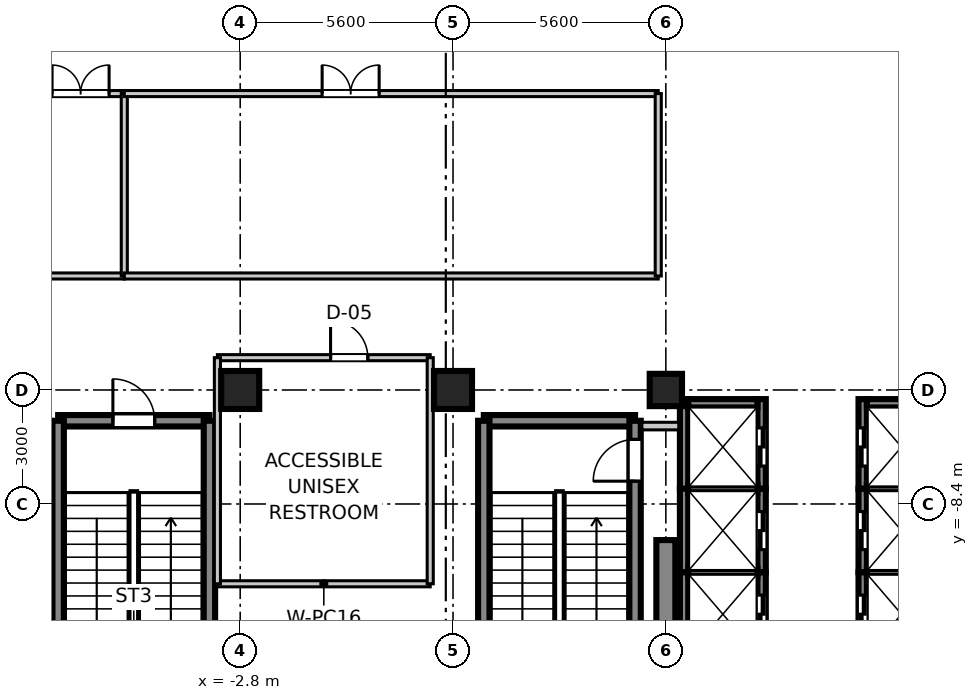
"""IFC4 building model, lengths in metres.
Left out: names, types, materials, properties, quantities, classifications, styles, units other than length and angle.
Written with IfcOpenShell. Run it as: python <this file> out.ifc"""

import sys

from ifc_helpers import new_model, si_unit, direction, frame, frame_2d, origin, origin_2d, place, context, subcontext, project, spatial, rectangle, extrude, source, transform, mapped, element, fill, save


model = new_model("IFC4")
c1 = context("Model", 3, precision=1e-05, world=origin(), true_north=direction((0.0, 1.0)))
c2 = subcontext(c1, "Body", "Model", "MODEL_VIEW")
j1 = project(units=[si_unit("LENGTHUNIT", "METRE"), si_unit("PLANEANGLEUNIT", "RADIAN")], contexts=[c1])
p1 = place(None, origin())
s1 = spatial("IfcSite", under=j1, at=p1, CompositionType="ELEMENT")
p2 = place(p1, origin())
s2 = spatial("IfcBuilding", under=s1, at=p2, CompositionType="ELEMENT")
p3 = place(p2, frame((0.0, 0.0, 256.7)))
s3 = spatial("IfcBuildingStorey", under=s2, at=p3, CompositionType="ELEMENT", Elevation=256.7)
m1 = source(origin(), c2, "Body", "SweptSolid", [
    extrude(rectangle(XDim=1.0, YDim=1.0, at=origin_2d()), origin(), (0.0, 0.0, 1.0), 4.755),
])
for number, where, z_axis, x_axis in (
    (1, (-2.8, -5.4, 0.0), (0.0, 0.0, 1.0), (1.0, 0.0, 0.0)),
    (2, (2.8, -5.4, 0.0), (0.0, 0.0, 1.0), (1.0, 0.0, 0.0)),
):
    element("IfcColumn", number, at=place(p3, frame(where, z_axis=z_axis, x_axis=x_axis)), inside=s3, PredefinedType="COLUMN", context=c2, shape_type="MappedRepresentation", body=[
        mapped(m1, transform((0.0, 0.0, 0.0), scale=1.0)),
    ])
m2 = source(origin(), c2, "Body", "SweptSolid", [
    extrude(rectangle(XDim=0.85, YDim=0.85, at=origin_2d()), origin(), (0.0, 0.0, 1.0), 4.755),
])
p4 = place(p3, frame((8.4, -5.4, 0.0), z_axis=(0.0, 0.0, 1.0), x_axis=(1.0, 0.0, 0.0)))
e3 = element("IfcColumn", 3, at=p4, inside=s3, PredefinedType="PILASTER", context=c2, shape_type="MappedRepresentation", body=[
    mapped(m2, transform((0.0, 0.0, 0.0), scale=1.0)),
])
m3 = source(origin(), c2, "Body", "SweptSolid", [
    extrude(rectangle(XDim=7.65, YDim=0.5, at=frame_2d((3.825, 0.0))), origin(), (0.0, 0.0, 1.0), 4.44),
])
p5 = place(p3, frame((8.4, -17.0, 0.0), z_axis=(0.0, 0.0, 1.0), x_axis=(0.0, 1.0, 0.0)))
e4 = element("IfcWall", 4, at=p5, inside=s3, PredefinedType="SHEAR", context=c2, shape_type="MappedRepresentation", body=[
    mapped(m3, transform((0.0, 0.0, 0.0), scale=1.0)),
])
m4 = source(origin(), c2, "Body", "SweptSolid", [
    extrude(rectangle(XDim=3.98, YDim=0.3, at=frame_2d((1.99, 0.0))), origin(), (0.0, 0.0, 1.0), 4.44),
])
p6 = place(p3, frame((3.61, -6.21, 0.0), z_axis=(0.0, 0.0, 1.0), x_axis=(1.0, 0.0, 0.0)))
e5 = element("IfcWall", 5, at=p6, inside=s3, PredefinedType="SHEAR", context=c2, shape_type="MappedRepresentation", body=[
    mapped(m4, transform((0.0, 0.0, 0.0), scale=1.0)),
])
m5 = source(origin(), c2, "Body", "SweptSolid", [
    extrude(rectangle(XDim=9.38, YDim=0.3, at=frame_2d((4.69, 0.0))), origin(), (0.0, 0.0, 1.0), 4.44),
])
p7 = place(p3, frame((3.61, -15.59, 0.0), z_axis=(0.0, 0.0, 1.0), x_axis=(0.0, 1.0, 0.0)))
e6 = element("IfcWall", 6, at=p7, inside=s3, PredefinedType="SHEAR", context=c2, shape_type="MappedRepresentation", body=[
    mapped(m5, transform((0.0, 0.0, 0.0), scale=1.0)),
])
p8 = place(p3, frame((7.59, -15.59, 0.0), z_axis=(0.0, 0.0, 1.0), x_axis=(0.0, 1.0, 0.0)))
e7 = element("IfcWall", 7, at=p8, inside=s3, PredefinedType="SHEAR", context=c2, shape_type="MappedRepresentation", body=[
    mapped(m5, transform((0.0, 0.0, 0.0), scale=1.0)),
])
p9 = place(p8, frame((7.79, 0.0, 0.0)))
e8 = element("IfcOpeningElement", 8, at=p9, cuts=e7, PredefinedType="OPENING", context=c2, shape_type="SweptSolid", body=[
    extrude(rectangle(XDim=1.1, YDim=2.15, at=frame_2d((0.55, 1.075))), frame((0.0, 0.16, 0.0), z_axis=(0.0, -1.0, 0.0), x_axis=(1.0, 0.0, 0.0)), (0.0, 0.0, 1.0), 0.32),
])
p10 = place(p3, frame((-7.59, -6.21, 0.0), z_axis=(0.0, 0.0, 1.0), x_axis=(1.0, 0.0, 0.0)))
e9 = element("IfcWall", 9, at=p10, inside=s3, PredefinedType="SHEAR", context=c2, shape_type="MappedRepresentation", body=[
    mapped(m4, transform((0.0, 0.0, 0.0), scale=1.0)),
])
p11 = place(p10, frame((1.44, 0.0, 0.0)))
e10 = element("IfcOpeningElement", 10, at=p11, cuts=e9, PredefinedType="OPENING", context=c2, shape_type="SweptSolid", body=[
    extrude(rectangle(XDim=1.1, YDim=2.15, at=frame_2d((0.55, 1.075))), frame((0.0, 0.16, 0.0), z_axis=(0.0, -1.0, 0.0), x_axis=(1.0, 0.0, 0.0)), (0.0, 0.0, 1.0), 0.32),
])
for number, where, z_axis, x_axis in (
    (11, (-7.59, -15.59, 0.0), (0.0, 0.0, 1.0), (0.0, 1.0, 0.0)),
    (12, (-3.61, -15.59, 0.0), (0.0, 0.0, 1.0), (0.0, 1.0, 0.0)),
):
    element("IfcWall", number, at=place(p3, frame(where, z_axis=z_axis, x_axis=x_axis)), inside=s3, PredefinedType="SHEAR", context=c2, shape_type="MappedRepresentation", body=[
        mapped(m5, transform((0.0, 0.0, 0.0), scale=1.0)),
    ])
m6 = source(origin(), c2, "Body", "SweptSolid", [
    extrude(rectangle(XDim=2.36, YDim=0.22, at=frame_2d((1.18, 0.0))), origin(), (0.0, 0.0, 1.0), 4.44),
])
p12 = place(p3, frame((13.58, -8.0, 0.0), z_axis=(0.0, 0.0, 1.0), x_axis=(0.0, 1.0, 0.0)))
e13 = element("IfcWall", 13, at=p12, inside=s3, PredefinedType="SHEAR", context=c2, shape_type="MappedRepresentation", body=[
    mapped(m6, transform((0.0, 0.0, 0.0), scale=1.0)),
])
p13 = place(p12, frame((0.6, 0.0, 0.0)))
e14 = element("IfcOpeningElement", 14, at=p13, cuts=e13, PredefinedType="OPENING", context=c2, shape_type="SweptSolid", body=[
    extrude(rectangle(XDim=1.0, YDim=2.2, at=frame_2d((0.5, 1.1))), frame((0.0, 0.12, 0.0), z_axis=(0.0, -1.0, 0.0), x_axis=(1.0, 0.0, 0.0)), (0.0, 0.0, 1.0), 0.24),
])
m7 = source(origin(), c2, "Body", "SweptSolid", [
    extrude(rectangle(XDim=1.82, YDim=0.22, at=frame_2d((0.91, 0.0))), origin(), (0.0, 0.0, 1.0), 4.44),
])
p14 = place(p3, frame((13.69, -5.75, 0.0), z_axis=(0.0, 0.0, 1.0), x_axis=(1.0, 0.0, 0.0)))
e15 = element("IfcWall", 15, at=p14, inside=s3, PredefinedType="SHEAR", context=c2, shape_type="MappedRepresentation", body=[
    mapped(m7, transform((0.0, 0.0, 0.0), scale=1.0)),
])
m8 = source(origin(), c2, "Body", "SweptSolid", [
    extrude(rectangle(XDim=2.2, YDim=0.22, at=frame_2d((1.1, 0.0))), origin(), (0.0, 0.0, 1.0), 4.44),
])
p15 = place(p3, frame((13.58, -10.2, 0.0), z_axis=(0.0, 0.0, 1.0), x_axis=(0.0, 1.0, 0.0)))
e16 = element("IfcWall", 16, at=p15, inside=s3, PredefinedType="SHEAR", context=c2, shape_type="MappedRepresentation", body=[
    mapped(m8, transform((0.0, 0.0, 0.0), scale=1.0)),
])
p16 = place(p15, frame((0.6, 0.0, 0.0)))
e17 = element("IfcOpeningElement", 17, at=p16, cuts=e16, PredefinedType="OPENING", context=c2, shape_type="SweptSolid", body=[
    extrude(rectangle(XDim=1.0, YDim=2.2, at=frame_2d((0.5, 1.1))), frame((0.0, 0.12, 0.0), z_axis=(0.0, -1.0, 0.0), x_axis=(1.0, 0.0, 0.0)), (0.0, 0.0, 1.0), 0.24),
])
m9 = source(origin(), c2, "Body", "SweptSolid", [
    extrude(rectangle(XDim=1.82, YDim=0.22, at=frame_2d((0.91, 0.0))), origin(), (0.0, 0.0, 1.0), 4.8),
])
p17 = place(p3, frame((13.69, -8.0, 0.0), z_axis=(0.0, 0.0, 1.0), x_axis=(1.0, 0.0, 0.0)))
e18 = element("IfcWall", 18, at=p17, inside=s3, PredefinedType="SHEAR", context=c2, shape_type="MappedRepresentation", body=[
    mapped(m9, transform((0.0, 0.0, 0.0), scale=1.0)),
])
p18 = place(p3, frame((13.58, -12.4, 0.0), z_axis=(0.0, 0.0, 1.0), x_axis=(0.0, 1.0, 0.0)))
e19 = element("IfcWall", 19, at=p18, inside=s3, PredefinedType="SHEAR", context=c2, shape_type="MappedRepresentation", body=[
    mapped(m8, transform((0.0, 0.0, 0.0), scale=1.0)),
])
p19 = place(p18, frame((0.6, 0.0, 0.0)))
e20 = element("IfcOpeningElement", 20, at=p19, cuts=e19, PredefinedType="OPENING", context=c2, shape_type="SweptSolid", body=[
    extrude(rectangle(XDim=1.0, YDim=2.2, at=frame_2d((0.5, 1.1))), frame((0.0, 0.12, 0.0), z_axis=(0.0, -1.0, 0.0), x_axis=(1.0, 0.0, 0.0)), (0.0, 0.0, 1.0), 0.24),
])
p20 = place(p3, frame((13.69, -10.2, 0.0), z_axis=(0.0, 0.0, 1.0), x_axis=(1.0, 0.0, 0.0)))
e21 = element("IfcWall", 21, at=p20, inside=s3, PredefinedType="SHEAR", context=c2, shape_type="MappedRepresentation", body=[
    mapped(m9, transform((0.0, 0.0, 0.0), scale=1.0)),
])
p21 = place(p3, frame((8.88, -8.0, 0.0), z_axis=(0.0, 0.0, 1.0), x_axis=(0.0, 1.0, 0.0)))
e22 = element("IfcWall", 22, at=p21, inside=s3, PredefinedType="SHEAR", context=c2, shape_type="MappedRepresentation", body=[
    mapped(m6, transform((0.0, 0.0, 0.0), scale=1.0)),
])
p22 = place(p3, frame((10.92, -8.0, 0.0), z_axis=(0.0, 0.0, 1.0), x_axis=(0.0, 1.0, 0.0)))
e23 = element("IfcWall", 23, at=p22, inside=s3, PredefinedType="SHEAR", context=c2, shape_type="MappedRepresentation", body=[
    mapped(m6, transform((0.0, 0.0, 0.0), scale=1.0)),
])
p23 = place(p22, frame((0.6, 0.0, 0.0)))
e24 = element("IfcOpeningElement", 24, at=p23, cuts=e23, PredefinedType="OPENING", context=c2, shape_type="SweptSolid", body=[
    extrude(rectangle(XDim=1.0, YDim=2.2, at=frame_2d((0.5, 1.1))), frame((0.0, 0.12, 0.0), z_axis=(0.0, -1.0, 0.0), x_axis=(1.0, 0.0, 0.0)), (0.0, 0.0, 1.0), 0.24),
])
p24 = place(p3, frame((8.99, -5.75, 0.0), z_axis=(0.0, 0.0, 1.0), x_axis=(1.0, 0.0, 0.0)))
e25 = element("IfcWall", 25, at=p24, inside=s3, PredefinedType="SHEAR", context=c2, shape_type="MappedRepresentation", body=[
    mapped(m7, transform((0.0, 0.0, 0.0), scale=1.0)),
])
p25 = place(p3, frame((8.88, -10.2, 0.0), z_axis=(0.0, 0.0, 1.0), x_axis=(0.0, 1.0, 0.0)))
e26 = element("IfcWall", 26, at=p25, inside=s3, PredefinedType="SHEAR", context=c2, shape_type="MappedRepresentation", body=[
    mapped(m8, transform((0.0, 0.0, 0.0), scale=1.0)),
])
p26 = place(p3, frame((10.92, -10.2, 0.0), z_axis=(0.0, 0.0, 1.0), x_axis=(0.0, 1.0, 0.0)))
e27 = element("IfcWall", 27, at=p26, inside=s3, PredefinedType="SHEAR", context=c2, shape_type="MappedRepresentation", body=[
    mapped(m8, transform((0.0, 0.0, 0.0), scale=1.0)),
])
p27 = place(p26, frame((0.6, 0.0, 0.0)))
e28 = element("IfcOpeningElement", 28, at=p27, cuts=e27, PredefinedType="OPENING", context=c2, shape_type="SweptSolid", body=[
    extrude(rectangle(XDim=1.0, YDim=2.2, at=frame_2d((0.5, 1.1))), frame((0.0, 0.12, 0.0), z_axis=(0.0, -1.0, 0.0), x_axis=(1.0, 0.0, 0.0)), (0.0, 0.0, 1.0), 0.24),
])
p28 = place(p3, frame((8.99, -8.0, 0.0), z_axis=(0.0, 0.0, 1.0), x_axis=(1.0, 0.0, 0.0)))
e29 = element("IfcWall", 29, at=p28, inside=s3, PredefinedType="SHEAR", context=c2, shape_type="MappedRepresentation", body=[
    mapped(m9, transform((0.0, 0.0, 0.0), scale=1.0)),
])
p29 = place(p3, frame((8.88, -12.4, 0.0), z_axis=(0.0, 0.0, 1.0), x_axis=(0.0, 1.0, 0.0)))
e30 = element("IfcWall", 30, at=p29, inside=s3, PredefinedType="SHEAR", context=c2, shape_type="MappedRepresentation", body=[
    mapped(m8, transform((0.0, 0.0, 0.0), scale=1.0)),
])
p30 = place(p3, frame((10.92, -12.4, 0.0), z_axis=(0.0, 0.0, 1.0), x_axis=(0.0, 1.0, 0.0)))
e31 = element("IfcWall", 31, at=p30, inside=s3, PredefinedType="SHEAR", context=c2, shape_type="MappedRepresentation", body=[
    mapped(m8, transform((0.0, 0.0, 0.0), scale=1.0)),
])
p31 = place(p30, frame((0.6, 0.0, 0.0)))
e32 = element("IfcOpeningElement", 32, at=p31, cuts=e31, PredefinedType="OPENING", context=c2, shape_type="SweptSolid", body=[
    extrude(rectangle(XDim=1.0, YDim=2.2, at=frame_2d((0.5, 1.1))), frame((0.0, 0.12, 0.0), z_axis=(0.0, -1.0, 0.0), x_axis=(1.0, 0.0, 0.0)), (0.0, 0.0, 1.0), 0.24),
])
p32 = place(p3, frame((8.99, -10.2, 0.0), z_axis=(0.0, 0.0, 1.0), x_axis=(1.0, 0.0, 0.0)))
e33 = element("IfcWall", 33, at=p32, inside=s3, PredefinedType="SHEAR", context=c2, shape_type="MappedRepresentation", body=[
    mapped(m9, transform((0.0, 0.0, 0.0), scale=1.0)),
])
m10 = source(origin(), c2, "Body", "SweptSolid", [
    extrude(rectangle(XDim=0.97, YDim=0.2, at=frame_2d((0.485, 0.0))), origin(), (0.0, 0.0, 1.0), 3.4),
])
p33 = place(p3, frame((7.77, -6.35, 0.0), z_axis=(0.0, 0.0, 1.0), x_axis=(1.0, 0.0, 0.0)))
e34 = element("IfcWall", 34, at=p33, inside=s3, PredefinedType="PARTITIONING", context=c2, shape_type="MappedRepresentation", body=[
    mapped(m10, transform((0.0, 0.0, 0.0), scale=1.0)),
])
m11 = source(origin(), c2, "Body", "SweptSolid", [
    extrude(rectangle(XDim=18.05, YDim=0.16, at=frame_2d((9.025, 0.0))), origin(), (0.0, 0.0, 1.0), 3.4),
])
p34 = place(p3, frame((-23.9, -2.4, 0.0), z_axis=(0.0, 0.0, 1.0), x_axis=(1.0, 0.0, 0.0)))
e35 = element("IfcWall", 35, at=p34, inside=s3, PredefinedType="PARTITIONING", context=c2, shape_type="MappedRepresentation", body=[
    mapped(m11, transform((0.0, 0.0, 0.0), scale=1.0)),
])
p35 = place(p3, frame((-23.9, 2.4, 0.0), z_axis=(0.0, 0.0, 1.0), x_axis=(1.0, 0.0, 0.0)))
e36 = element("IfcWall", 36, at=p35, inside=s3, PredefinedType="PARTITIONING", context=c2, shape_type="MappedRepresentation", body=[
    mapped(m11, transform((0.0, 0.0, 0.0), scale=1.0)),
])
p36 = place(p35, frame((16.15, 0.0, 0.0)))
e37 = element("IfcOpeningElement", 37, at=p36, cuts=e36, PredefinedType="OPENING", context=c2, shape_type="SweptSolid", body=[
    extrude(rectangle(XDim=1.5, YDim=2.15, at=frame_2d((0.75, 1.075))), frame((0.0, 0.09, 0.0), z_axis=(0.0, -1.0, 0.0), x_axis=(1.0, 0.0, 0.0)), (0.0, 0.0, 1.0), 0.18),
])
m12 = source(origin(), c2, "Body", "SweptSolid", [
    extrude(rectangle(XDim=4.8, YDim=0.16, at=frame_2d((2.4, 0.0))), origin(), (0.0, 0.0, 1.0), 3.4),
])
p37 = place(p3, frame((-5.85, -2.4, 0.0), z_axis=(0.0, 0.0, 1.0), x_axis=(0.0, 1.0, 0.0)))
e38 = element("IfcWall", 38, at=p37, inside=s3, PredefinedType="PARTITIONING", context=c2, shape_type="MappedRepresentation", body=[
    mapped(m12, transform((0.0, 0.0, 0.0), scale=1.0)),
])
m13 = source(origin(), c2, "Body", "SweptSolid", [
    extrude(rectangle(XDim=14.05, YDim=0.16, at=frame_2d((7.025, 0.0))), origin(), (0.0, 0.0, 1.0), 3.4),
])
p38 = place(p3, frame((-5.85, -2.4, 0.0), z_axis=(0.0, 0.0, 1.0), x_axis=(1.0, 0.0, 0.0)))
e39 = element("IfcWall", 39, at=p38, inside=s3, PredefinedType="PARTITIONING", context=c2, shape_type="MappedRepresentation", body=[
    mapped(m13, transform((0.0, 0.0, 0.0), scale=1.0)),
])
p39 = place(p3, frame((-5.85, 2.4, 0.0), z_axis=(0.0, 0.0, 1.0), x_axis=(1.0, 0.0, 0.0)))
e40 = element("IfcWall", 40, at=p39, inside=s3, PredefinedType="PARTITIONING", context=c2, shape_type="MappedRepresentation", body=[
    mapped(m13, transform((0.0, 0.0, 0.0), scale=1.0)),
])
p40 = place(p39, frame((5.206, 0.0, 0.0)))
e41 = element("IfcOpeningElement", 41, at=p40, cuts=e40, PredefinedType="OPENING", context=c2, shape_type="SweptSolid", body=[
    extrude(rectangle(XDim=1.5, YDim=2.15, at=frame_2d((0.75, 1.075))), frame((0.0, 0.09, 0.0), z_axis=(0.0, -1.0, 0.0), x_axis=(1.0, 0.0, 0.0)), (0.0, 0.0, 1.0), 0.18),
])
p41 = place(p3, frame((8.2, -2.4, 0.0), z_axis=(0.0, 0.0, 1.0), x_axis=(0.0, 1.0, 0.0)))
e42 = element("IfcWall", 42, at=p41, inside=s3, PredefinedType="PARTITIONING", context=c2, shape_type="MappedRepresentation", body=[
    mapped(m12, transform((0.0, 0.0, 0.0), scale=1.0)),
])
m14 = source(origin(), c2, "Body", "SweptSolid", [
    extrude(rectangle(XDim=5.6, YDim=0.16, at=frame_2d((2.8, 0.0))), origin(), (0.0, 0.0, 1.0), 3.4),
])
p42 = place(p3, frame((-3.4, -10.5, 0.0), z_axis=(0.0, 0.0, 1.0), x_axis=(1.0, 0.0, 0.0)))
e43 = element("IfcWall", 43, at=p42, inside=s3, PredefinedType="PARTITIONING", context=c2, shape_type="MappedRepresentation", body=[
    mapped(m14, transform((0.0, 0.0, 0.0), scale=1.0)),
])
p43 = place(p3, frame((-3.4, -4.55, 0.0), z_axis=(0.0, 0.0, 1.0), x_axis=(1.0, 0.0, 0.0)))
e44 = element("IfcWall", 44, at=p43, inside=s3, PredefinedType="PARTITIONING", context=c2, shape_type="MappedRepresentation", body=[
    mapped(m14, transform((0.0, 0.0, 0.0), scale=1.0)),
])
p44 = place(p43, frame((2.978, 0.0, 0.0)))
e45 = element("IfcOpeningElement", 45, at=p44, cuts=e44, PredefinedType="OPENING", context=c2, shape_type="SweptSolid", body=[
    extrude(rectangle(XDim=0.98, YDim=2.1, at=frame_2d((0.49, 1.05))), frame((0.0, 0.09, 0.0), z_axis=(0.0, -1.0, 0.0), x_axis=(1.0, 0.0, 0.0)), (0.0, 0.0, 1.0), 0.18),
])
m15 = source(origin(), c2, "Body", "SweptSolid", [
    extrude(rectangle(XDim=5.95, YDim=0.16, at=frame_2d((2.975, 0.0))), origin(), (0.0, 0.0, 1.0), 3.4),
])
for number, where, z_axis, x_axis in (
    (46, (-3.4, -10.5, 0.0), (0.0, 0.0, 1.0), (0.0, 1.0, 0.0)),
    (47, (2.2, -10.5, 0.0), (0.0, 0.0, 1.0), (0.0, 1.0, 0.0)),
):
    element("IfcWall", number, at=place(p3, frame(where, z_axis=z_axis, x_axis=x_axis)), inside=s3, PredefinedType="PARTITIONING", context=c2, shape_type="MappedRepresentation", body=[
        mapped(m15, transform((0.0, 0.0, 0.0), scale=1.0)),
    ])
m16 = source(origin(), c2, "Body", "SweptSolid", [
    extrude(rectangle(XDim=1.1, YDim=2.15, at=frame_2d((0.55, 1.075))), frame((0.0, 0.025, 0.0), z_axis=(0.0, -1.0, 0.0), x_axis=(1.0, 0.0, 0.0)), (0.0, 0.0, 1.0), 0.05),
])
p45 = place(p9, origin())
e48 = element("IfcDoor", 48, at=p45, inside=s3, OperationType="SINGLE_SWING_LEFT", PredefinedType="DOOR", context=c2, shape_type="MappedRepresentation", body=[
    mapped(m16, transform((0.0, 0.0, 0.0), scale=1.0)),
])
fill(e8, e48)
p46 = place(p11, frame((1.1, 0.0, 0.0), z_axis=(0.0, 0.0, 1.0), x_axis=(-1.0, 0.0, 0.0)))
e49 = element("IfcDoor", 49, at=p46, inside=s3, OperationType="SINGLE_SWING_LEFT", PredefinedType="DOOR", context=c2, shape_type="MappedRepresentation", body=[
    mapped(m16, transform((0.0, 0.0, 0.0), scale=1.0)),
])
fill(e10, e49)
m17 = source(origin(), c2, "Body", "SweptSolid", [
    extrude(rectangle(XDim=1.0, YDim=2.2, at=frame_2d((0.5, 1.1))), frame((0.0, 0.025, 0.0), z_axis=(0.0, -1.0, 0.0), x_axis=(1.0, 0.0, 0.0)), (0.0, 0.0, 1.0), 0.05),
])
p47 = place(p13, origin())
e50 = element("IfcDoor", 50, at=p47, inside=s3, OperationType="DOUBLE_DOOR_SLIDING", PredefinedType="DOOR", context=c2, shape_type="MappedRepresentation", body=[
    mapped(m17, transform((0.0, 0.0, 0.0), scale=1.0)),
])
fill(e14, e50)
p48 = place(p16, origin())
e51 = element("IfcDoor", 51, at=p48, inside=s3, OperationType="DOUBLE_DOOR_SLIDING", PredefinedType="DOOR", context=c2, shape_type="MappedRepresentation", body=[
    mapped(m17, transform((0.0, 0.0, 0.0), scale=1.0)),
])
fill(e17, e51)
p49 = place(p19, origin())
e52 = element("IfcDoor", 52, at=p49, inside=s3, OperationType="DOUBLE_DOOR_SLIDING", PredefinedType="DOOR", context=c2, shape_type="MappedRepresentation", body=[
    mapped(m17, transform((0.0, 0.0, 0.0), scale=1.0)),
])
fill(e20, e52)
p50 = place(p23, frame((1.0, 0.0, 0.0), z_axis=(0.0, 0.0, 1.0), x_axis=(-1.0, 0.0, 0.0)))
e53 = element("IfcDoor", 53, at=p50, inside=s3, OperationType="DOUBLE_DOOR_SLIDING", PredefinedType="DOOR", context=c2, shape_type="MappedRepresentation", body=[
    mapped(m17, transform((0.0, 0.0, 0.0), scale=1.0)),
])
fill(e24, e53)
p51 = place(p27, frame((1.0, 0.0, 0.0), z_axis=(0.0, 0.0, 1.0), x_axis=(-1.0, 0.0, 0.0)))
e54 = element("IfcDoor", 54, at=p51, inside=s3, OperationType="DOUBLE_DOOR_SLIDING", PredefinedType="DOOR", context=c2, shape_type="MappedRepresentation", body=[
    mapped(m17, transform((0.0, 0.0, 0.0), scale=1.0)),
])
fill(e28, e54)
p52 = place(p31, frame((1.0, 0.0, 0.0), z_axis=(0.0, 0.0, 1.0), x_axis=(-1.0, 0.0, 0.0)))
e55 = element("IfcDoor", 55, at=p52, inside=s3, OperationType="DOUBLE_DOOR_SLIDING", PredefinedType="DOOR", context=c2, shape_type="MappedRepresentation", body=[
    mapped(m17, transform((0.0, 0.0, 0.0), scale=1.0)),
])
fill(e32, e55)
m18 = source(origin(), c2, "Body", "SweptSolid", [
    extrude(rectangle(XDim=1.5, YDim=2.15, at=frame_2d((0.75, 1.075))), frame((0.0, 0.025, 0.0), z_axis=(0.0, -1.0, 0.0), x_axis=(1.0, 0.0, 0.0)), (0.0, 0.0, 1.0), 0.05),
])
p53 = place(p36, frame((1.5, 0.0, 0.0), z_axis=(0.0, 0.0, 1.0), x_axis=(-1.0, 0.0, 0.0)))
e56 = element("IfcDoor", 56, at=p53, inside=s3, OperationType="DOUBLE_DOOR_SINGLE_SWING", PredefinedType="DOOR", context=c2, shape_type="MappedRepresentation", body=[
    mapped(m18, transform((0.0, 0.0, 0.0), scale=1.0)),
])
fill(e37, e56)
p54 = place(p40, frame((1.5, 0.0, 0.0), z_axis=(0.0, 0.0, 1.0), x_axis=(-1.0, 0.0, 0.0)))
e57 = element("IfcDoor", 57, at=p54, inside=s3, OperationType="DOUBLE_DOOR_SINGLE_SWING", PredefinedType="DOOR", context=c2, shape_type="MappedRepresentation", body=[
    mapped(m18, transform((0.0, 0.0, 0.0), scale=1.0)),
])
fill(e41, e57)
m19 = source(origin(), c2, "Body", "SweptSolid", [
    extrude(rectangle(XDim=0.98, YDim=2.1, at=frame_2d((0.49, 1.05))), frame((0.0, 0.025, 0.0), z_axis=(0.0, -1.0, 0.0), x_axis=(1.0, 0.0, 0.0)), (0.0, 0.0, 1.0), 0.05),
])
p55 = place(p44, frame((0.98, 0.0, 0.0), z_axis=(0.0, 0.0, 1.0), x_axis=(-1.0, 0.0, 0.0)))
e58 = element("IfcDoor", 58, at=p55, inside=s3, OperationType="SINGLE_SWING_LEFT", PredefinedType="DOOR", context=c2, shape_type="MappedRepresentation", body=[
    mapped(m19, transform((0.0, 0.0, 0.0), scale=1.0)),
])
fill(e45, e58)
save(model, sys.argv[1])
